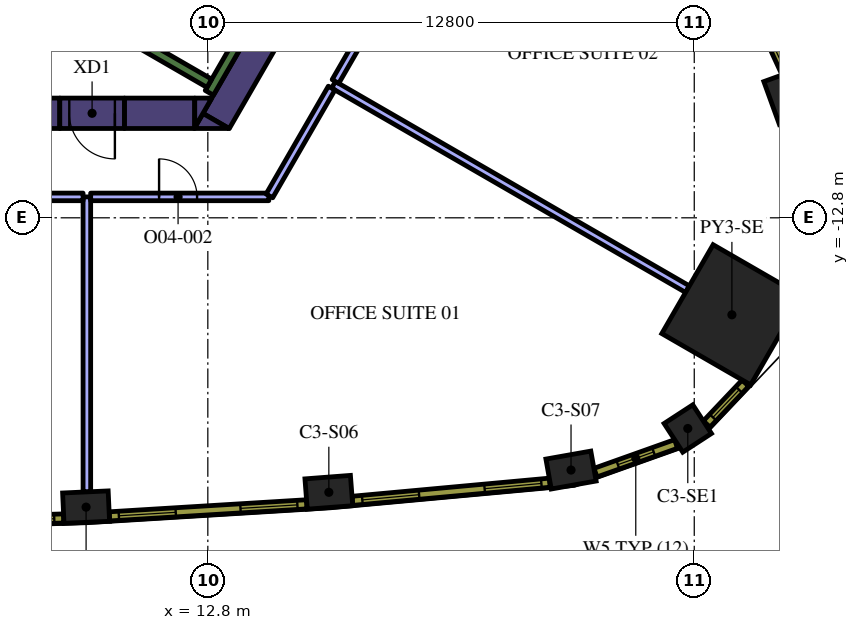
"""IFC4 building model, lengths in metres.
Left out: names, types, materials, properties, quantities, classifications, styles, units other than length and angle.
Written with IfcOpenShell. Run it as: python <this file> out.ifc"""

import sys

from ifc_helpers import new_model, si_unit, direction, frame, frame_2d, origin, origin_2d, place, context, subcontext, project, spatial, polyline, rectangle, outline, extrude, element, fill, save


model = new_model("IFC4")
c1 = context("Model", 3, precision=1e-05, world=origin(), true_north=direction((0.0, 1.0)))
c2 = subcontext(c1, "Body", "Model", "MODEL_VIEW")
j1 = project(units=[si_unit("LENGTHUNIT", "METRE"), si_unit("PLANEANGLEUNIT", "RADIAN")], contexts=[c1])
p1 = place(None, origin())
s1 = spatial("IfcSite", under=j1, at=p1, CompositionType="ELEMENT")
p2 = place(p1, origin())
s2 = spatial("IfcBuilding", under=s1, at=p2, CompositionType="ELEMENT")
p3 = place(p2, frame((0.0, 0.0, 179.4)))
s3 = spatial("IfcBuildingStorey", under=s2, at=p3, CompositionType="ELEMENT", Elevation=179.4)
p4 = place(p3, frame((26.591, -15.352, 0.0), z_axis=(0.0, 0.0, 1.0), x_axis=(0.866025403784, -0.5, 0.0)))
e1 = element("IfcColumn", 1, at=p4, inside=s3, PredefinedType="COLUMN", context=c2, shape_type="SweptSolid", body=[
    extrude(rectangle(XDim=2.7, YDim=2.7, at=origin_2d()), origin(), (0.0, 0.0, 1.0), 4.2),
])
for number, where, z_axis, x_axis in (
    (2, (9.597, -20.413, 0.0), (0.0, 0.0, 1.0), (0.999, 0.046, 0.0)),
    (3, (15.985, -20.022, 0.0), (0.0, 0.0, 1.0), (0.997, 0.076, 0.0)),
    (4, (22.357, -19.437, 0.0), (0.0, 0.0, 1.0), (0.985, 0.175, 0.0)),
):
    element("IfcColumn", number, at=place(p3, frame(where, z_axis=z_axis, x_axis=x_axis)), inside=s3, PredefinedType="COLUMN", context=c2, shape_type="SweptSolid", body=[
        extrude(rectangle(XDim=1.2, YDim=0.8, at=origin_2d()), origin(), (0.0, 0.0, 1.0), 4.2),
    ])
p5 = place(p3, frame((25.43, -18.344, 0.0), z_axis=(0.0, 0.0, 1.0), x_axis=(0.838094050847, 0.545525766518, 0.0)))
e5 = element("IfcColumn", 5, at=p5, inside=s3, PredefinedType="COLUMN", context=c2, shape_type="SweptSolid", body=[
    extrude(rectangle(XDim=0.9, YDim=0.9, at=origin_2d()), origin(), (0.0, 0.0, 1.0), 4.2),
])
p6 = place(p3, frame((28.012, -9.644, 0.0), z_axis=(0.0, 0.0, 1.0), x_axis=(-0.340743851601, 0.940156171918, 0.0)))
e6 = element("IfcColumn", 6, at=p6, inside=s3, PredefinedType="COLUMN", context=c2, shape_type="SweptSolid", body=[
    extrude(rectangle(XDim=1.2, YDim=0.8, at=origin_2d()), origin(), (0.0, 0.0, 1.0), 4.2),
])
p7 = place(p3, frame((13.018, -10.252, 0.0), z_axis=(0.0, 0.0, 1.0), x_axis=(0.499984020225, 0.866034629516, 0.0)))
e7 = element("IfcWall", 7, at=p7, inside=s3, PredefinedType="SOLIDWALL", context=c2, shape_type="SweptSolid", body=[
    extrude(rectangle(XDim=3.824, YDim=0.8, at=frame_2d((1.912, 0.0))), origin(), (0.0, 0.0, 1.0), 4.2),
])
p8 = place(p3, origin())
e8 = element("IfcWall", 8, at=p8, inside=s3, PredefinedType="SOLIDWALL", context=c2, shape_type="SweptSolid", body=[
    extrude(outline(polyline([(12.671, -10.053), (13.358, -10.45), (12.442, -10.45), (12.671, -10.053)])), origin(), (0.0, 0.0, 1.0), 4.2),
])
p9 = place(p3, frame((10.604, -10.05, 0.0), z_axis=(0.0, 0.0, 1.0), x_axis=(1.0, 0.0, 0.0)))
e9 = element("IfcWall", 9, at=p9, inside=s3, PredefinedType="SOLIDWALL", context=c2, shape_type="SweptSolid", body=[
    extrude(rectangle(XDim=1.849, YDim=0.8, at=frame_2d((0.925, 0.0))), origin(), (0.0, 0.0, 1.0), 4.2),
])
e10 = element("IfcWall", 10, at=p8, inside=s3, PredefinedType="SOLIDWALL", context=c2, shape_type="SweptSolid", body=[
    extrude(outline(polyline([(12.904, -9.65), (12.456, -10.426), (12.456, -9.65), (12.904, -9.65)])), origin(), (0.0, 0.0, 1.0), 4.2),
])
p10 = place(p3, frame((-13.378, -10.05, 0.0), z_axis=(0.0, 0.0, 1.0), x_axis=(1.0, 0.0, 0.0)))
e11 = element("IfcWall", 11, at=p10, inside=s3, PredefinedType="SOLIDWALL", context=c2, shape_type="SweptSolid", body=[
    extrude(rectangle(XDim=22.282, YDim=0.8, at=frame_2d((11.141, 0.0))), origin(), (0.0, 0.0, 1.0), 4.2),
])
p11 = place(p3, frame((12.84, -9.511, 0.0), z_axis=(0.0, 0.0, 1.0), x_axis=(0.499997733992, 0.866026712061, 0.0)))
e12 = element("IfcWall", 12, at=p11, inside=s3, PredefinedType="SOLIDWALL", context=c2, shape_type="SweptSolid", body=[
    extrude(rectangle(XDim=3.634, YDim=0.25, at=frame_2d((1.817, 0.0))), origin(), (0.0, 0.0, 1.0), 4.2),
])
p12 = place(p3, frame((12.84, -9.261, 0.0), z_axis=(0.0, 0.0, 1.0), x_axis=(-0.866013990052, 0.500019768644, 0.0)))
e13 = element("IfcWall", 13, at=p12, inside=s3, PredefinedType="SOLIDWALL", context=c2, shape_type="SweptSolid", body=[
    extrude(rectangle(XDim=6.8, YDim=0.25, at=frame_2d((3.4, 0.0))), origin(), (0.0, 0.0, 1.0), 4.2),
])
p13 = place(p3, frame((10.604, -10.05, 0.0), z_axis=(0.0, 0.0, 1.0), x_axis=(-1.0, 0.0, 0.0)))
e14 = element("IfcWall", 14, at=p13, inside=s3, PredefinedType="SOLIDWALL", context=c2, shape_type="SweptSolid", body=[
    extrude(rectangle(XDim=1.7, YDim=0.8, at=frame_2d((0.85, 0.0))), origin(), (0.0, 0.0, 1.0), 4.2),
])
p14 = place(p13, frame((0.25, 0.0, 0.0)))
e15 = element("IfcOpeningElement", 15, at=p14, cuts=e14, PredefinedType="OPENING", context=c2, shape_type="SweptSolid", body=[
    extrude(rectangle(XDim=1.2, YDim=2.1, at=frame_2d((0.6, 1.05))), frame((0.0, 0.41, 0.0), z_axis=(0.0, -1.0, 0.0), x_axis=(1.0, 0.0, 0.0)), (0.0, 0.0, 1.0), 0.82),
])
p15 = place(p3, frame((9.617, -12.25, 0.0), z_axis=(0.0, 0.0, 1.0), x_axis=(0.0, -1.0, 0.0)))
e16 = element("IfcWall", 16, at=p15, inside=s3, PredefinedType="PARTITIONING", context=c2, shape_type="SweptSolid", body=[
    extrude(rectangle(XDim=7.761, YDim=0.2, at=frame_2d((3.881, 0.0))), origin(), (0.0, 0.0, 1.0), 3.15),
])
p16 = place(p3, frame((3.53, -12.25, 0.0), z_axis=(0.0, 0.0, 1.0), x_axis=(1.0, 0.0, 0.0)))
e17 = element("IfcWall", 17, at=p16, inside=s3, PredefinedType="PARTITIONING", context=c2, shape_type="SweptSolid", body=[
    extrude(rectangle(XDim=5.987, YDim=0.2, at=frame_2d((2.994, 0.0))), origin(), (0.0, 0.0, 1.0), 3.15),
])
p17 = place(p3, frame((16.108, -9.3, 0.0), z_axis=(0.0, 0.0, 1.0), x_axis=(0.866027180319, -0.499996922939, 0.0)))
e18 = element("IfcWall", 18, at=p17, inside=s3, PredefinedType="PARTITIONING", context=c2, shape_type="SweptSolid", body=[
    extrude(rectangle(XDim=10.754, YDim=0.2, at=frame_2d((5.377, 0.0))), origin(), (0.0, 0.0, 1.0), 3.15),
])
p18 = place(p3, frame((9.717, -12.25, 0.0), z_axis=(0.0, 0.0, 1.0), x_axis=(1.0, 0.0, 0.0)))
e19 = element("IfcWall", 19, at=p18, inside=s3, PredefinedType="PARTITIONING", context=c2, shape_type="SweptSolid", body=[
    extrude(rectangle(XDim=4.688, YDim=0.2, at=frame_2d((2.344, 0.0))), origin(), (0.0, 0.0, 1.0), 3.15),
])
p19 = place(p18, frame((1.8, 0.0, 0.0)))
e20 = element("IfcOpeningElement", 20, at=p19, cuts=e19, PredefinedType="OPENING", context=c2, shape_type="SweptSolid", body=[
    extrude(rectangle(XDim=1.0, YDim=2.1, at=frame_2d((0.5, 1.05))), frame((0.0, 0.11, 0.0), z_axis=(0.0, -1.0, 0.0), x_axis=(1.0, 0.0, 0.0)), (0.0, 0.0, 1.0), 0.22),
])
p20 = place(p3, frame((14.42, -12.224, 0.0), z_axis=(0.0, 0.0, 1.0), x_axis=(0.500001965626, 0.866024268927, 0.0)))
e21 = element("IfcWall", 21, at=p20, inside=s3, PredefinedType="PARTITIONING", context=c2, shape_type="SweptSolid", body=[
    extrude(rectangle(XDim=3.276, YDim=0.2, at=frame_2d((1.638, 0.0))), origin(), (0.0, 0.0, 1.0), 3.15),
])
p21 = place(p3, frame((16.158, -9.213, 0.0), z_axis=(0.0, 0.0, 1.0), x_axis=(0.499990919662, 0.866030646256, 0.0)))
e22 = element("IfcWall", 22, at=p21, inside=s3, PredefinedType="PARTITIONING", context=c2, shape_type="SweptSolid", body=[
    extrude(rectangle(XDim=3.306, YDim=0.2, at=frame_2d((1.653, 0.0))), origin(), (0.0, 0.0, 1.0), 3.15),
])
p22 = place(p3, frame((3.806, -20.87, 0.0), z_axis=(0.0, 0.0, 1.0), x_axis=(0.999533441983, 0.030543384845, 0.0)))
e23 = element("IfcWall", 23, at=p22, inside=s3, PredefinedType="SOLIDWALL", context=c2, shape_type="SweptSolid", body=[
    extrude(rectangle(XDim=5.204, YDim=0.24, at=frame_2d((2.602, 0.0))), origin(), (0.0, 0.0, 1.0), 3.95),
])
p23 = place(p22, frame((0.248, 0.0, 0.9)))
e24 = element("IfcOpeningElement", 24, at=p23, cuts=e23, PredefinedType="OPENING", context=c2, shape_type="SweptSolid", body=[
    extrude(rectangle(XDim=1.5, YDim=2.55, at=frame_2d((0.75, 1.275))), frame((0.0, 0.13, 0.0), z_axis=(0.0, -1.0, 0.0), x_axis=(1.0, 0.0, 0.0)), (0.0, 0.0, 1.0), 0.26),
])
p24 = place(p22, frame((3.455, 0.0, 0.9)))
e25 = element("IfcOpeningElement", 25, at=p24, cuts=e23, PredefinedType="OPENING", context=c2, shape_type="SweptSolid", body=[
    extrude(rectangle(XDim=1.5, YDim=2.55, at=frame_2d((0.75, 1.275))), frame((0.0, 0.13, 0.0), z_axis=(0.0, -1.0, 0.0), x_axis=(1.0, 0.0, 0.0)), (0.0, 0.0, 1.0), 0.26),
])
p25 = place(p3, frame((10.211, -20.656, 0.0), z_axis=(0.0, 0.0, 1.0), x_axis=(0.998135294646, 0.061040425794, 0.0)))
e26 = element("IfcWall", 26, at=p25, inside=s3, PredefinedType="SOLIDWALL", context=c2, shape_type="SweptSolid", body=[
    extrude(rectangle(XDim=5.204, YDim=0.24, at=frame_2d((2.602, 0.0))), origin(), (0.0, 0.0, 1.0), 3.95),
])
p26 = place(p25, frame((0.248, 0.0, 0.9)))
e27 = element("IfcOpeningElement", 27, at=p26, cuts=e26, PredefinedType="OPENING", context=c2, shape_type="SweptSolid", body=[
    extrude(rectangle(XDim=1.5, YDim=2.55, at=frame_2d((0.75, 1.275))), frame((0.0, 0.13, 0.0), z_axis=(0.0, -1.0, 0.0), x_axis=(1.0, 0.0, 0.0)), (0.0, 0.0, 1.0), 0.26),
])
p27 = place(p25, frame((3.455, 0.0, 0.9)))
e28 = element("IfcOpeningElement", 28, at=p27, cuts=e26, PredefinedType="OPENING", context=c2, shape_type="SweptSolid", body=[
    extrude(rectangle(XDim=1.5, YDim=2.55, at=frame_2d((0.75, 1.275))), frame((0.0, 0.13, 0.0), z_axis=(0.0, -1.0, 0.0), x_axis=(1.0, 0.0, 0.0)), (0.0, 0.0, 1.0), 0.26),
])
p28 = place(p3, frame((16.606, -20.247, 0.0), z_axis=(0.0, 0.0, 1.0), x_axis=(0.995808712151, 0.091460422067, 0.0)))
e29 = element("IfcWall", 29, at=p28, inside=s3, PredefinedType="SOLIDWALL", context=c2, shape_type="SweptSolid", body=[
    extrude(rectangle(XDim=5.213, YDim=0.24, at=frame_2d((2.606, 0.0))), origin(), (0.0, 0.0, 1.0), 3.95),
])
p29 = place(p28, frame((0.261, 0.0, 0.9)))
e30 = element("IfcOpeningElement", 30, at=p29, cuts=e29, PredefinedType="OPENING", context=c2, shape_type="SweptSolid", body=[
    extrude(rectangle(XDim=1.5, YDim=2.55, at=frame_2d((0.75, 1.275))), frame((0.0, 0.13, 0.0), z_axis=(0.0, -1.0, 0.0), x_axis=(1.0, 0.0, 0.0)), (0.0, 0.0, 1.0), 0.26),
])
p30 = place(p28, frame((3.492, 0.0, 0.9)))
e31 = element("IfcOpeningElement", 31, at=p30, cuts=e29, PredefinedType="OPENING", context=c2, shape_type="SweptSolid", body=[
    extrude(rectangle(XDim=1.5, YDim=2.55, at=frame_2d((0.75, 1.275))), frame((0.0, 0.13, 0.0), z_axis=(0.0, -1.0, 0.0), x_axis=(1.0, 0.0, 0.0)), (0.0, 0.0, 1.0), 0.26),
])
p31 = place(p3, frame((23.001, -19.505, 0.0), z_axis=(0.0, 0.0, 1.0), x_axis=(0.942099727267, 0.335332825539, 0.0)))
e32 = element("IfcWall", 32, at=p31, inside=s3, PredefinedType="SOLIDWALL", context=c2, shape_type="SweptSolid", body=[
    extrude(rectangle(XDim=2.25, YDim=0.24, at=frame_2d((1.125, 0.0))), origin(), (0.0, 0.0, 1.0), 3.95),
])
p32 = place(p31, frame((0.625, 0.0, 0.9)))
e33 = element("IfcOpeningElement", 33, at=p32, cuts=e32, PredefinedType="OPENING", context=c2, shape_type="SweptSolid", body=[
    extrude(rectangle(XDim=1.0, YDim=2.55, at=frame_2d((0.5, 1.275))), frame((0.0, 0.13, 0.0), z_axis=(0.0, -1.0, 0.0), x_axis=(1.0, 0.0, 0.0)), (0.0, 0.0, 1.0), 0.26),
])
p33 = place(p3, frame((25.927, -18.226, 0.0), z_axis=(0.0, 0.0, 1.0), x_axis=(0.687986858937, 0.725723144133, 0.0)))
e34 = element("IfcWall", 34, at=p33, inside=s3, PredefinedType="SOLIDWALL", context=c2, shape_type="SweptSolid", body=[
    extrude(rectangle(XDim=1.481, YDim=0.24, at=frame_2d((0.741, 0.0))), origin(), (0.0, 0.0, 1.0), 3.95),
])
p34 = place(p33, frame((0.241, 0.0, 0.9)))
e35 = element("IfcOpeningElement", 35, at=p34, cuts=e34, PredefinedType="OPENING", context=c2, shape_type="SweptSolid", body=[
    extrude(rectangle(XDim=1.0, YDim=2.55, at=frame_2d((0.5, 1.275))), frame((0.0, 0.13, 0.0), z_axis=(0.0, -1.0, 0.0), x_axis=(1.0, 0.0, 0.0)), (0.0, 0.0, 1.0), 0.26),
])
p35 = place(p3, frame((28.02, -8.992, 0.0), z_axis=(0.0, 0.0, 1.0), x_axis=(-0.418722559465, 0.908114209885, 0.0)))
e36 = element("IfcWall", 36, at=p35, inside=s3, PredefinedType="SOLIDWALL", context=c2, shape_type="SweptSolid", body=[
    extrude(rectangle(XDim=5.213, YDim=0.24, at=frame_2d((2.606, 0.0))), origin(), (0.0, 0.0, 1.0), 3.95),
])
p36 = place(p35, frame((0.221, 0.0, 0.9)))
e37 = element("IfcOpeningElement", 37, at=p36, cuts=e36, PredefinedType="OPENING", context=c2, shape_type="SweptSolid", body=[
    extrude(rectangle(XDim=1.5, YDim=2.55, at=frame_2d((0.75, 1.275))), frame((0.0, 0.13, 0.0), z_axis=(0.0, -1.0, 0.0), x_axis=(1.0, 0.0, 0.0)), (0.0, 0.0, 1.0), 0.26),
])
p37 = place(p35, frame((3.452, 0.0, 0.9)))
e38 = element("IfcOpeningElement", 38, at=p37, cuts=e36, PredefinedType="OPENING", context=c2, shape_type="SweptSolid", body=[
    extrude(rectangle(XDim=1.5, YDim=2.55, at=frame_2d((0.75, 1.275))), frame((0.0, 0.13, 0.0), z_axis=(0.0, -1.0, 0.0), x_axis=(1.0, 0.0, 0.0)), (0.0, 0.0, 1.0), 0.26),
])
p38 = place(p14, origin())
e39 = element("IfcDoor", 39, at=p38, inside=s3, OperationType="SINGLE_SWING_LEFT", PredefinedType="DOOR", context=c2, shape_type="SweptSolid", body=[
    extrude(rectangle(XDim=1.2, YDim=2.1, at=frame_2d((0.6, 1.05))), frame((0.0, 0.025, 0.0), z_axis=(0.0, -1.0, 0.0), x_axis=(1.0, 0.0, 0.0)), (0.0, 0.0, 1.0), 0.05),
])
fill(e15, e39)
p39 = place(p19, origin())
e40 = element("IfcDoor", 40, at=p39, inside=s3, OperationType="SINGLE_SWING_LEFT", PredefinedType="DOOR", context=c2, shape_type="SweptSolid", body=[
    extrude(rectangle(XDim=1.0, YDim=2.1, at=frame_2d((0.5, 1.05))), frame((0.0, 0.025, 0.0), z_axis=(0.0, -1.0, 0.0), x_axis=(1.0, 0.0, 0.0)), (0.0, 0.0, 1.0), 0.05),
])
fill(e20, e40)
p40 = place(p24, origin())
e41 = element("IfcWindow", 41, at=p40, inside=s3, PartitioningType="SINGLE_PANEL", PredefinedType="WINDOW", context=c2, shape_type="SweptSolid", body=[
    extrude(rectangle(XDim=1.5, YDim=2.55, at=frame_2d((0.75, 1.275))), frame((0.0, 0.04, 0.0), z_axis=(0.0, -1.0, 0.0), x_axis=(1.0, 0.0, 0.0)), (0.0, 0.0, 1.0), 0.06),
])
fill(e25, e41)
p41 = place(p26, origin())
e42 = element("IfcWindow", 42, at=p41, inside=s3, PartitioningType="SINGLE_PANEL", PredefinedType="WINDOW", context=c2, shape_type="SweptSolid", body=[
    extrude(rectangle(XDim=1.5, YDim=2.55, at=frame_2d((0.75, 1.275))), frame((0.0, 0.04, 0.0), z_axis=(0.0, -1.0, 0.0), x_axis=(1.0, 0.0, 0.0)), (0.0, 0.0, 1.0), 0.06),
])
fill(e27, e42)
p42 = place(p27, origin())
e43 = element("IfcWindow", 43, at=p42, inside=s3, PartitioningType="SINGLE_PANEL", PredefinedType="WINDOW", context=c2, shape_type="SweptSolid", body=[
    extrude(rectangle(XDim=1.5, YDim=2.55, at=frame_2d((0.75, 1.275))), frame((0.0, 0.04, 0.0), z_axis=(0.0, -1.0, 0.0), x_axis=(1.0, 0.0, 0.0)), (0.0, 0.0, 1.0), 0.06),
])
fill(e28, e43)
p43 = place(p29, origin())
e44 = element("IfcWindow", 44, at=p43, inside=s3, PartitioningType="SINGLE_PANEL", PredefinedType="WINDOW", context=c2, shape_type="SweptSolid", body=[
    extrude(rectangle(XDim=1.5, YDim=2.55, at=frame_2d((0.75, 1.275))), frame((0.0, 0.04, 0.0), z_axis=(0.0, -1.0, 0.0), x_axis=(1.0, 0.0, 0.0)), (0.0, 0.0, 1.0), 0.06),
])
fill(e30, e44)
p44 = place(p30, origin())
e45 = element("IfcWindow", 45, at=p44, inside=s3, PartitioningType="SINGLE_PANEL", PredefinedType="WINDOW", context=c2, shape_type="SweptSolid", body=[
    extrude(rectangle(XDim=1.5, YDim=2.55, at=frame_2d((0.75, 1.275))), frame((0.0, 0.04, 0.0), z_axis=(0.0, -1.0, 0.0), x_axis=(1.0, 0.0, 0.0)), (0.0, 0.0, 1.0), 0.06),
])
fill(e31, e45)
p45 = place(p32, origin())
e46 = element("IfcWindow", 46, at=p45, inside=s3, PartitioningType="SINGLE_PANEL", PredefinedType="WINDOW", context=c2, shape_type="SweptSolid", body=[
    extrude(rectangle(XDim=1.0, YDim=2.55, at=frame_2d((0.5, 1.275))), frame((0.0, 0.04, 0.0), z_axis=(0.0, -1.0, 0.0), x_axis=(1.0, 0.0, 0.0)), (0.0, 0.0, 1.0), 0.06),
])
fill(e33, e46)
p46 = place(p34, origin())
e47 = element("IfcWindow", 47, at=p46, inside=s3, PartitioningType="SINGLE_PANEL", PredefinedType="WINDOW", context=c2, shape_type="SweptSolid", body=[
    extrude(rectangle(XDim=1.0, YDim=2.55, at=frame_2d((0.5, 1.275))), frame((0.0, 0.04, 0.0), z_axis=(0.0, -1.0, 0.0), x_axis=(1.0, 0.0, 0.0)), (0.0, 0.0, 1.0), 0.06),
])
fill(e35, e47)
p47 = place(p36, origin())
e48 = element("IfcWindow", 48, at=p47, inside=s3, PartitioningType="SINGLE_PANEL", PredefinedType="WINDOW", context=c2, shape_type="SweptSolid", body=[
    extrude(rectangle(XDim=1.5, YDim=2.55, at=frame_2d((0.75, 1.275))), frame((0.0, 0.04, 0.0), z_axis=(0.0, -1.0, 0.0), x_axis=(1.0, 0.0, 0.0)), (0.0, 0.0, 1.0), 0.06),
])
fill(e37, e48)
save(model, sys.argv[1])
